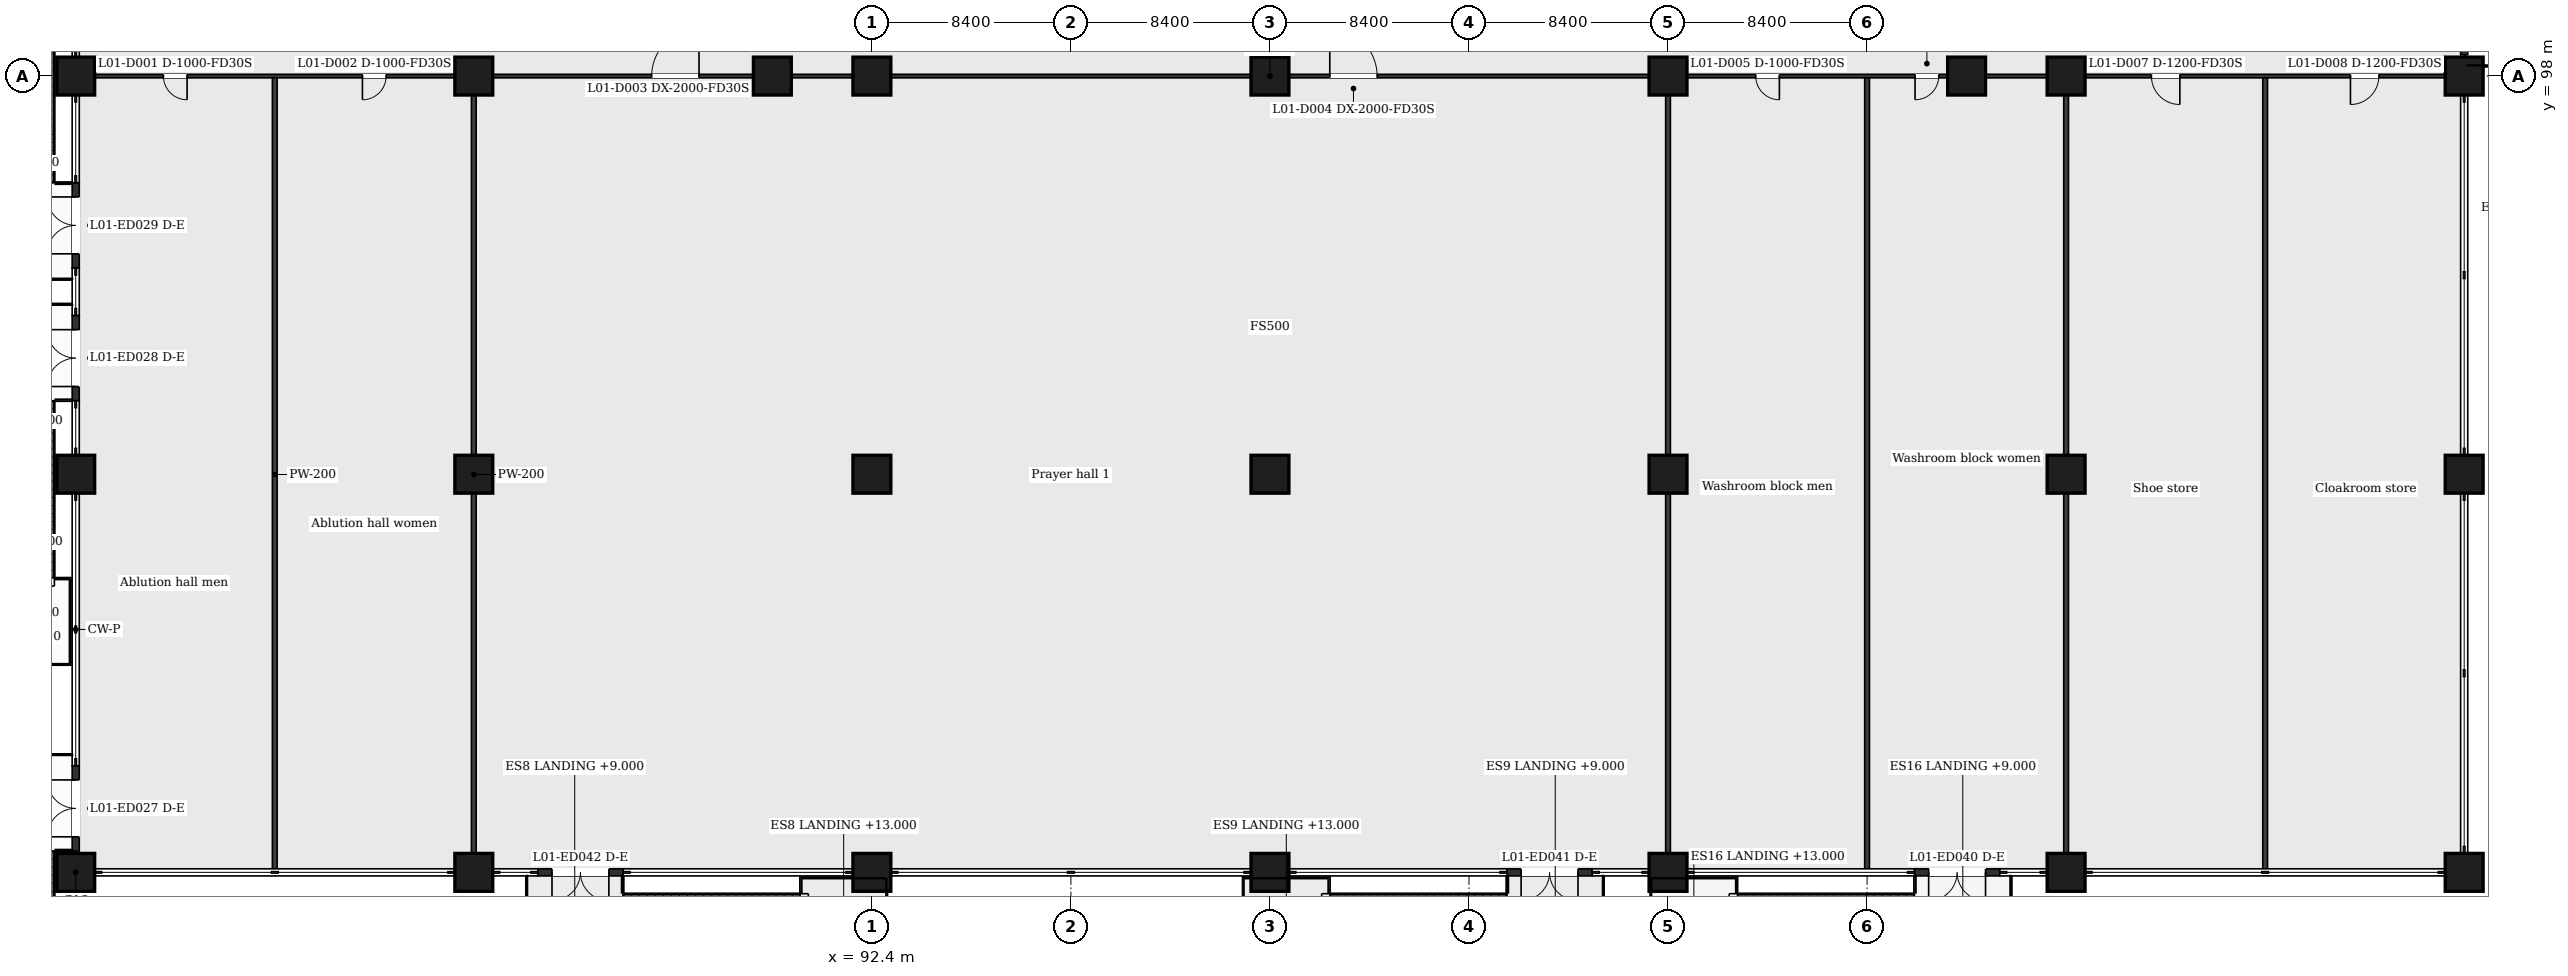
"""IFC4 building model, lengths in metres.
Left out: names, types, materials, properties, quantities, classifications, styles, units other than length and angle.
Written with IfcOpenShell. Run it as: python <this file> out.ifc"""

import sys

from ifc_helpers import new_model, si_unit, direction, frame, frame_2d, origin, origin_2d, place, context, subcontext, project, spatial, rectangle, extrude, element, fill, save


model = new_model("IFC4")
c1 = context("Model", 3, precision=1e-05, world=origin(), true_north=direction((0.0, 1.0)))
c2 = subcontext(c1, "Body", "Model", "MODEL_VIEW")
j1 = project(units=[si_unit("LENGTHUNIT", "METRE"), si_unit("PLANEANGLEUNIT", "RADIAN")], contexts=[c1])
p1 = place(None, origin())
s1 = spatial("IfcSite", under=j1, at=p1, CompositionType="ELEMENT")
p2 = place(p1, origin())
s2 = spatial("IfcBuilding", under=s1, at=p2, CompositionType="ELEMENT")
p3 = place(p2, frame((0.0, 0.0, 9.0)))
s3 = spatial("IfcBuildingStorey", under=s2, at=p3, CompositionType="ELEMENT", Elevation=9.0)
for number, where, z_axis, x_axis in (
    (1, (58.8, 64.4, 0.0), (0.0, 0.0, 1.0), (1.0, 0.0, 0.0)),
    (2, (75.6, 64.4, 0.0), (0.0, 0.0, 1.0), (1.0, 0.0, 0.0)),
    (3, (92.4, 64.4, 0.0), (0.0, 0.0, 1.0), (1.0, 0.0, 0.0)),
    (4, (109.2, 64.4, 0.0), (0.0, 0.0, 1.0), (1.0, 0.0, 0.0)),
    (5, (126.0, 64.4, 0.0), (0.0, 0.0, 1.0), (1.0, 0.0, 0.0)),
    (6, (142.8, 64.4, 0.0), (0.0, 0.0, 1.0), (1.0, 0.0, 0.0)),
    (7, (159.6, 64.4, 0.0), (0.0, 0.0, 1.0), (1.0, 0.0, 0.0)),
    (8, (58.8, 81.2, 0.0), (0.0, 0.0, 1.0), (1.0, 0.0, 0.0)),
    (9, (75.6, 81.2, 0.0), (0.0, 0.0, 1.0), (1.0, 0.0, 0.0)),
    (10, (92.4, 81.2, 0.0), (0.0, 0.0, 1.0), (1.0, 0.0, 0.0)),
    (11, (109.2, 81.2, 0.0), (0.0, 0.0, 1.0), (1.0, 0.0, 0.0)),
    (12, (126.0, 81.2, 0.0), (0.0, 0.0, 1.0), (1.0, 0.0, 0.0)),
    (13, (142.8, 81.2, 0.0), (0.0, 0.0, 1.0), (1.0, 0.0, 0.0)),
    (14, (159.6, 81.2, 0.0), (0.0, 0.0, 1.0), (1.0, 0.0, 0.0)),
    (15, (58.8, 98.0, 0.0), (0.0, 0.0, 1.0), (1.0, 0.0, 0.0)),
    (16, (75.6, 98.0, 0.0), (0.0, 0.0, 1.0), (1.0, 0.0, 0.0)),
    (17, (88.2, 98.0, 0.0), (0.0, 0.0, 1.0), (1.0, 0.0, 0.0)),
    (18, (92.4, 98.0, 0.0), (0.0, 0.0, 1.0), (1.0, 0.0, 0.0)),
    (19, (109.2, 98.0, 0.0), (0.0, 0.0, 1.0), (1.0, 0.0, 0.0)),
    (20, (126.0, 98.0, 0.0), (0.0, 0.0, 1.0), (1.0, 0.0, 0.0)),
    (21, (138.6, 98.0, 0.0), (0.0, 0.0, 1.0), (1.0, 0.0, 0.0)),
    (22, (142.8, 98.0, 0.0), (0.0, 0.0, 1.0), (1.0, 0.0, 0.0)),
    (23, (159.6, 98.0, 0.0), (0.0, 0.0, 1.0), (1.0, 0.0, 0.0)),
):
    element("IfcColumn", number, at=place(p3, frame(where, z_axis=z_axis, x_axis=x_axis)), inside=s3, PredefinedType="COLUMN", context=c2, shape_type="SweptSolid", body=[
        extrude(rectangle(XDim=1.6, YDim=1.6, at=origin_2d()), origin(), (0.0, 0.0, 1.0), 8.0),
    ])
p4 = place(p3, frame((58.8, 65.3, 0.0), z_axis=(0.0, 0.0, 1.0), x_axis=(0.0, 1.0, 0.0)))
e24 = element("IfcWall", 24, at=p4, inside=s3, PredefinedType="SOLIDWALL", context=c2, shape_type="SweptSolid", body=[
    extrude(rectangle(XDim=3.6, YDim=0.3, at=frame_2d((1.8, 0.0))), origin(), (0.0, 0.0, 1.0), 7.1),
])
p5 = place(p4, frame((0.6, 0.0, 0.0)))
e25 = element("IfcOpeningElement", 25, at=p5, cuts=e24, PredefinedType="OPENING", context=c2, shape_type="SweptSolid", body=[
    extrude(rectangle(XDim=2.4, YDim=2.4, at=frame_2d((1.2, 1.2))), frame((0.0, 0.16, 0.0), z_axis=(0.0, -1.0, 0.0), x_axis=(1.0, 0.0, 0.0)), (0.0, 0.0, 1.0), 0.32),
])
p6 = place(p3, frame((58.8, 84.3, 0.0), z_axis=(0.0, 0.0, 1.0), x_axis=(0.0, 1.0, 0.0)))
e26 = element("IfcWall", 26, at=p6, inside=s3, PredefinedType="SOLIDWALL", context=c2, shape_type="SweptSolid", body=[
    extrude(rectangle(XDim=3.6, YDim=0.3, at=frame_2d((1.8, 0.0))), origin(), (0.0, 0.0, 1.0), 7.1),
])
p7 = place(p6, frame((0.6, 0.0, 0.0)))
e27 = element("IfcOpeningElement", 27, at=p7, cuts=e26, PredefinedType="OPENING", context=c2, shape_type="SweptSolid", body=[
    extrude(rectangle(XDim=2.4, YDim=2.4, at=frame_2d((1.2, 1.2))), frame((0.0, 0.16, 0.0), z_axis=(0.0, -1.0, 0.0), x_axis=(1.0, 0.0, 0.0)), (0.0, 0.0, 1.0), 0.32),
])
p8 = place(p3, frame((58.8, 89.9, 0.0), z_axis=(0.0, 0.0, 1.0), x_axis=(0.0, 1.0, 0.0)))
e28 = element("IfcWall", 28, at=p8, inside=s3, PredefinedType="SOLIDWALL", context=c2, shape_type="SweptSolid", body=[
    extrude(rectangle(XDim=3.6, YDim=0.3, at=frame_2d((1.8, 0.0))), origin(), (0.0, 0.0, 1.0), 7.1),
])
p9 = place(p8, frame((0.6, 0.0, 0.0)))
e29 = element("IfcOpeningElement", 29, at=p9, cuts=e28, PredefinedType="OPENING", context=c2, shape_type="SweptSolid", body=[
    extrude(rectangle(XDim=2.4, YDim=2.4, at=frame_2d((1.2, 1.2))), frame((0.0, 0.16, 0.0), z_axis=(0.0, -1.0, 0.0), x_axis=(1.0, 0.0, 0.0)), (0.0, 0.0, 1.0), 0.32),
])
p10 = place(p3, frame((159.6, 102.5, 0.0), z_axis=(0.0, 0.0, 1.0), x_axis=(0.0, -1.0, 0.0)))
e30 = element("IfcWall", 30, at=p10, inside=s3, PredefinedType="SOLIDWALL", context=c2, shape_type="SweptSolid", body=[
    extrude(rectangle(XDim=3.6, YDim=0.3, at=frame_2d((1.8, 0.0))), origin(), (0.0, 0.0, 1.0), 7.1),
])
p11 = place(p10, frame((0.6, 0.0, 0.0)))
e31 = element("IfcOpeningElement", 31, at=p11, cuts=e30, PredefinedType="OPENING", context=c2, shape_type="SweptSolid", body=[
    extrude(rectangle(XDim=2.4, YDim=2.4, at=frame_2d((1.2, 1.2))), frame((0.0, 0.16, 0.0), z_axis=(0.0, -1.0, 0.0), x_axis=(1.0, 0.0, 0.0)), (0.0, 0.0, 1.0), 0.32),
])
p12 = place(p3, frame((140.0, 64.4, 0.0), z_axis=(0.0, 0.0, 1.0), x_axis=(-1.0, 0.0, 0.0)))
e32 = element("IfcWall", 32, at=p12, inside=s3, PredefinedType="SOLIDWALL", context=c2, shape_type="SweptSolid", body=[
    extrude(rectangle(XDim=3.6, YDim=0.3, at=frame_2d((1.8, 0.0))), origin(), (0.0, 0.0, 1.0), 7.1),
])
p13 = place(p12, frame((0.6, 0.0, 0.0)))
e33 = element("IfcOpeningElement", 33, at=p13, cuts=e32, PredefinedType="OPENING", context=c2, shape_type="SweptSolid", body=[
    extrude(rectangle(XDim=2.4, YDim=2.4, at=frame_2d((1.2, 1.2))), frame((0.0, 0.16, 0.0), z_axis=(0.0, -1.0, 0.0), x_axis=(1.0, 0.0, 0.0)), (0.0, 0.0, 1.0), 0.32),
])
p14 = place(p3, frame((122.8, 64.4, 0.0), z_axis=(0.0, 0.0, 1.0), x_axis=(-1.0, 0.0, 0.0)))
e34 = element("IfcWall", 34, at=p14, inside=s3, PredefinedType="SOLIDWALL", context=c2, shape_type="SweptSolid", body=[
    extrude(rectangle(XDim=3.6, YDim=0.3, at=frame_2d((1.8, 0.0))), origin(), (0.0, 0.0, 1.0), 7.1),
])
p15 = place(p14, frame((0.6, 0.0, 0.0)))
e35 = element("IfcOpeningElement", 35, at=p15, cuts=e34, PredefinedType="OPENING", context=c2, shape_type="SweptSolid", body=[
    extrude(rectangle(XDim=2.4, YDim=2.4, at=frame_2d((1.2, 1.2))), frame((0.0, 0.16, 0.0), z_axis=(0.0, -1.0, 0.0), x_axis=(1.0, 0.0, 0.0)), (0.0, 0.0, 1.0), 0.32),
])
p16 = place(p3, frame((81.9, 64.4, 0.0), z_axis=(0.0, 0.0, 1.0), x_axis=(-1.0, 0.0, 0.0)))
e36 = element("IfcWall", 36, at=p16, inside=s3, PredefinedType="SOLIDWALL", context=c2, shape_type="SweptSolid", body=[
    extrude(rectangle(XDim=3.6, YDim=0.3, at=frame_2d((1.8, 0.0))), origin(), (0.0, 0.0, 1.0), 7.1),
])
p17 = place(p16, frame((0.6, 0.0, 0.0)))
e37 = element("IfcOpeningElement", 37, at=p17, cuts=e36, PredefinedType="OPENING", context=c2, shape_type="SweptSolid", body=[
    extrude(rectangle(XDim=2.4, YDim=2.4, at=frame_2d((1.2, 1.2))), frame((0.0, 0.16, 0.0), z_axis=(0.0, -1.0, 0.0), x_axis=(1.0, 0.0, 0.0)), (0.0, 0.0, 1.0), 0.32),
])
p18 = place(p3, frame((58.85, 98.0, 0.0), z_axis=(0.0, 0.0, 1.0), x_axis=(1.0, 0.0, 0.0)))
e38 = element("IfcWall", 38, at=p18, inside=s3, PredefinedType="PARTITIONING", context=c2, shape_type="SweptSolid", body=[
    extrude(rectangle(XDim=100.7, YDim=0.15, at=frame_2d((50.35, 0.0))), origin(), (0.0, 0.0, 1.0), 7.5),
])
p19 = place(p18, frame((3.65, 0.0, 0.0)))
e39 = element("IfcOpeningElement", 39, at=p19, cuts=e38, PredefinedType="OPENING", context=c2, shape_type="SweptSolid", body=[
    extrude(rectangle(XDim=1.0, YDim=2.1, at=frame_2d((0.5, 1.05))), frame((0.0, 0.085, 0.0), z_axis=(0.0, -1.0, 0.0), x_axis=(1.0, 0.0, 0.0)), (0.0, 0.0, 1.0), 0.17),
])
p20 = place(p18, frame((12.05, 0.0, 0.0)))
e40 = element("IfcOpeningElement", 40, at=p20, cuts=e38, PredefinedType="OPENING", context=c2, shape_type="SweptSolid", body=[
    extrude(rectangle(XDim=1.0, YDim=2.1, at=frame_2d((0.5, 1.05))), frame((0.0, 0.085, 0.0), z_axis=(0.0, -1.0, 0.0), x_axis=(1.0, 0.0, 0.0)), (0.0, 0.0, 1.0), 0.17),
])
p21 = place(p18, frame((24.255, 0.0, 0.0)))
e41 = element("IfcOpeningElement", 41, at=p21, cuts=e38, PredefinedType="OPENING", context=c2, shape_type="SweptSolid", body=[
    extrude(rectangle(XDim=2.0, YDim=2.1, at=frame_2d((1.0, 1.05))), frame((0.0, 0.085, 0.0), z_axis=(0.0, -1.0, 0.0), x_axis=(1.0, 0.0, 0.0)), (0.0, 0.0, 1.0), 0.17),
])
p22 = place(p18, frame((52.875, 0.0, 0.0)))
e42 = element("IfcOpeningElement", 42, at=p22, cuts=e38, PredefinedType="OPENING", context=c2, shape_type="SweptSolid", body=[
    extrude(rectangle(XDim=2.0, YDim=2.1, at=frame_2d((1.0, 1.05))), frame((0.0, 0.085, 0.0), z_axis=(0.0, -1.0, 0.0), x_axis=(1.0, 0.0, 0.0)), (0.0, 0.0, 1.0), 0.17),
])
p23 = place(p18, frame((70.85, 0.0, 0.0)))
e43 = element("IfcOpeningElement", 43, at=p23, cuts=e38, PredefinedType="OPENING", context=c2, shape_type="SweptSolid", body=[
    extrude(rectangle(XDim=1.0, YDim=2.1, at=frame_2d((0.5, 1.05))), frame((0.0, 0.085, 0.0), z_axis=(0.0, -1.0, 0.0), x_axis=(1.0, 0.0, 0.0)), (0.0, 0.0, 1.0), 0.17),
])
p24 = place(p18, frame((77.575, 0.0, 0.0)))
e44 = element("IfcOpeningElement", 44, at=p24, cuts=e38, PredefinedType="OPENING", context=c2, shape_type="SweptSolid", body=[
    extrude(rectangle(XDim=1.0, YDim=2.1, at=frame_2d((0.5, 1.05))), frame((0.0, 0.085, 0.0), z_axis=(0.0, -1.0, 0.0), x_axis=(1.0, 0.0, 0.0)), (0.0, 0.0, 1.0), 0.17),
])
p25 = place(p18, frame((87.55, 0.0, 0.0)))
e45 = element("IfcOpeningElement", 45, at=p25, cuts=e38, PredefinedType="OPENING", context=c2, shape_type="SweptSolid", body=[
    extrude(rectangle(XDim=1.2, YDim=2.1, at=frame_2d((0.6, 1.05))), frame((0.0, 0.085, 0.0), z_axis=(0.0, -1.0, 0.0), x_axis=(1.0, 0.0, 0.0)), (0.0, 0.0, 1.0), 0.17),
])
p26 = place(p18, frame((95.95, 0.0, 0.0)))
e46 = element("IfcOpeningElement", 46, at=p26, cuts=e38, PredefinedType="OPENING", context=c2, shape_type="SweptSolid", body=[
    extrude(rectangle(XDim=1.2, YDim=2.1, at=frame_2d((0.6, 1.05))), frame((0.0, 0.085, 0.0), z_axis=(0.0, -1.0, 0.0), x_axis=(1.0, 0.0, 0.0)), (0.0, 0.0, 1.0), 0.17),
])
for number, where, z_axis, x_axis in (
    (47, (67.2, 64.45, 0.0), (0.0, 0.0, 1.0), (0.0, 1.0, 0.0)),
    (48, (75.6, 64.45, 0.0), (0.0, 0.0, 1.0), (0.0, 1.0, 0.0)),
    (49, (126.0, 64.45, 0.0), (0.0, 0.0, 1.0), (0.0, 1.0, 0.0)),
    (50, (134.4, 64.45, 0.0), (0.0, 0.0, 1.0), (0.0, 1.0, 0.0)),
    (51, (142.8, 64.45, 0.0), (0.0, 0.0, 1.0), (0.0, 1.0, 0.0)),
    (52, (151.2, 64.45, 0.0), (0.0, 0.0, 1.0), (0.0, 1.0, 0.0)),
):
    element("IfcWall", number, at=place(p3, frame(where, z_axis=z_axis, x_axis=x_axis)), inside=s3, PredefinedType="PARTITIONING", context=c2, shape_type="SweptSolid", body=[
        extrude(rectangle(XDim=33.475, YDim=0.2, at=frame_2d((16.738, 0.0))), origin(), (0.0, 0.0, 1.0), 7.5),
    ])
p27 = place(p5, origin())
e53 = element("IfcDoor", 53, at=p27, inside=s3, OperationType="DOUBLE_DOOR_DOUBLE_SWING", PredefinedType="DOOR", context=c2, shape_type="SweptSolid", body=[
    extrude(rectangle(XDim=2.4, YDim=2.4, at=frame_2d((1.2, 1.2))), frame((0.0, 0.025, 0.0), z_axis=(0.0, -1.0, 0.0), x_axis=(1.0, 0.0, 0.0)), (0.0, 0.0, 1.0), 0.05),
])
fill(e25, e53)
p28 = place(p7, origin())
e54 = element("IfcDoor", 54, at=p28, inside=s3, OperationType="DOUBLE_DOOR_DOUBLE_SWING", PredefinedType="DOOR", context=c2, shape_type="SweptSolid", body=[
    extrude(rectangle(XDim=2.4, YDim=2.4, at=frame_2d((1.2, 1.2))), frame((0.0, 0.025, 0.0), z_axis=(0.0, -1.0, 0.0), x_axis=(1.0, 0.0, 0.0)), (0.0, 0.0, 1.0), 0.05),
])
fill(e27, e54)
p29 = place(p9, origin())
e55 = element("IfcDoor", 55, at=p29, inside=s3, OperationType="DOUBLE_DOOR_DOUBLE_SWING", PredefinedType="DOOR", context=c2, shape_type="SweptSolid", body=[
    extrude(rectangle(XDim=2.4, YDim=2.4, at=frame_2d((1.2, 1.2))), frame((0.0, 0.025, 0.0), z_axis=(0.0, -1.0, 0.0), x_axis=(1.0, 0.0, 0.0)), (0.0, 0.0, 1.0), 0.05),
])
fill(e29, e55)
p30 = place(p13, origin())
e56 = element("IfcDoor", 56, at=p30, inside=s3, OperationType="DOUBLE_DOOR_DOUBLE_SWING", PredefinedType="DOOR", context=c2, shape_type="SweptSolid", body=[
    extrude(rectangle(XDim=2.4, YDim=2.4, at=frame_2d((1.2, 1.2))), frame((0.0, 0.025, 0.0), z_axis=(0.0, -1.0, 0.0), x_axis=(1.0, 0.0, 0.0)), (0.0, 0.0, 1.0), 0.05),
])
fill(e33, e56)
p31 = place(p15, origin())
e57 = element("IfcDoor", 57, at=p31, inside=s3, OperationType="DOUBLE_DOOR_DOUBLE_SWING", PredefinedType="DOOR", context=c2, shape_type="SweptSolid", body=[
    extrude(rectangle(XDim=2.4, YDim=2.4, at=frame_2d((1.2, 1.2))), frame((0.0, 0.025, 0.0), z_axis=(0.0, -1.0, 0.0), x_axis=(1.0, 0.0, 0.0)), (0.0, 0.0, 1.0), 0.05),
])
fill(e35, e57)
p32 = place(p17, origin())
e58 = element("IfcDoor", 58, at=p32, inside=s3, OperationType="DOUBLE_DOOR_DOUBLE_SWING", PredefinedType="DOOR", context=c2, shape_type="SweptSolid", body=[
    extrude(rectangle(XDim=2.4, YDim=2.4, at=frame_2d((1.2, 1.2))), frame((0.0, 0.025, 0.0), z_axis=(0.0, -1.0, 0.0), x_axis=(1.0, 0.0, 0.0)), (0.0, 0.0, 1.0), 0.05),
])
fill(e37, e58)
p33 = place(p19, origin())
e59 = element("IfcDoor", 59, at=p33, inside=s3, OperationType="SINGLE_SWING_RIGHT", PredefinedType="DOOR", context=c2, shape_type="SweptSolid", body=[
    extrude(rectangle(XDim=1.0, YDim=2.1, at=frame_2d((0.5, 1.05))), frame((0.0, 0.025, 0.0), z_axis=(0.0, -1.0, 0.0), x_axis=(1.0, 0.0, 0.0)), (0.0, 0.0, 1.0), 0.05),
])
fill(e39, e59)
p34 = place(p20, origin())
e60 = element("IfcDoor", 60, at=p34, inside=s3, OperationType="SINGLE_SWING_LEFT", PredefinedType="DOOR", context=c2, shape_type="SweptSolid", body=[
    extrude(rectangle(XDim=1.0, YDim=2.1, at=frame_2d((0.5, 1.05))), frame((0.0, 0.025, 0.0), z_axis=(0.0, -1.0, 0.0), x_axis=(1.0, 0.0, 0.0)), (0.0, 0.0, 1.0), 0.05),
])
fill(e40, e60)
p35 = place(p21, origin())
e61 = element("IfcDoor", 61, at=p35, inside=s3, OperationType="SINGLE_SWING_RIGHT", PredefinedType="DOOR", context=c2, shape_type="SweptSolid", body=[
    extrude(rectangle(XDim=2.0, YDim=2.1, at=frame_2d((1.0, 1.05))), frame((0.0, 0.025, 0.0), z_axis=(0.0, -1.0, 0.0), x_axis=(1.0, 0.0, 0.0)), (0.0, 0.0, 1.0), 0.05),
])
fill(e41, e61)
p36 = place(p22, origin())
e62 = element("IfcDoor", 62, at=p36, inside=s3, OperationType="SINGLE_SWING_LEFT", PredefinedType="DOOR", context=c2, shape_type="SweptSolid", body=[
    extrude(rectangle(XDim=2.0, YDim=2.1, at=frame_2d((1.0, 1.05))), frame((0.0, 0.025, 0.0), z_axis=(0.0, -1.0, 0.0), x_axis=(1.0, 0.0, 0.0)), (0.0, 0.0, 1.0), 0.05),
])
fill(e42, e62)
p37 = place(p23, origin())
e63 = element("IfcDoor", 63, at=p37, inside=s3, OperationType="SINGLE_SWING_RIGHT", PredefinedType="DOOR", context=c2, shape_type="SweptSolid", body=[
    extrude(rectangle(XDim=1.0, YDim=2.1, at=frame_2d((0.5, 1.05))), frame((0.0, 0.025, 0.0), z_axis=(0.0, -1.0, 0.0), x_axis=(1.0, 0.0, 0.0)), (0.0, 0.0, 1.0), 0.05),
])
fill(e43, e63)
p38 = place(p24, origin())
e64 = element("IfcDoor", 64, at=p38, inside=s3, OperationType="SINGLE_SWING_LEFT", PredefinedType="DOOR", context=c2, shape_type="SweptSolid", body=[
    extrude(rectangle(XDim=1.0, YDim=2.1, at=frame_2d((0.5, 1.05))), frame((0.0, 0.025, 0.0), z_axis=(0.0, -1.0, 0.0), x_axis=(1.0, 0.0, 0.0)), (0.0, 0.0, 1.0), 0.05),
])
fill(e44, e64)
p39 = place(p25, origin())
e65 = element("IfcDoor", 65, at=p39, inside=s3, OperationType="SINGLE_SWING_RIGHT", PredefinedType="DOOR", context=c2, shape_type="SweptSolid", body=[
    extrude(rectangle(XDim=1.2, YDim=2.1, at=frame_2d((0.6, 1.05))), frame((0.0, 0.025, 0.0), z_axis=(0.0, -1.0, 0.0), x_axis=(1.0, 0.0, 0.0)), (0.0, 0.0, 1.0), 0.05),
])
fill(e45, e65)
p40 = place(p26, origin())
e66 = element("IfcDoor", 66, at=p40, inside=s3, OperationType="SINGLE_SWING_LEFT", PredefinedType="DOOR", context=c2, shape_type="SweptSolid", body=[
    extrude(rectangle(XDim=1.2, YDim=2.1, at=frame_2d((0.6, 1.05))), frame((0.0, 0.025, 0.0), z_axis=(0.0, -1.0, 0.0), x_axis=(1.0, 0.0, 0.0)), (0.0, 0.0, 1.0), 0.05),
])
fill(e46, e66)
save(model, sys.argv[1])
